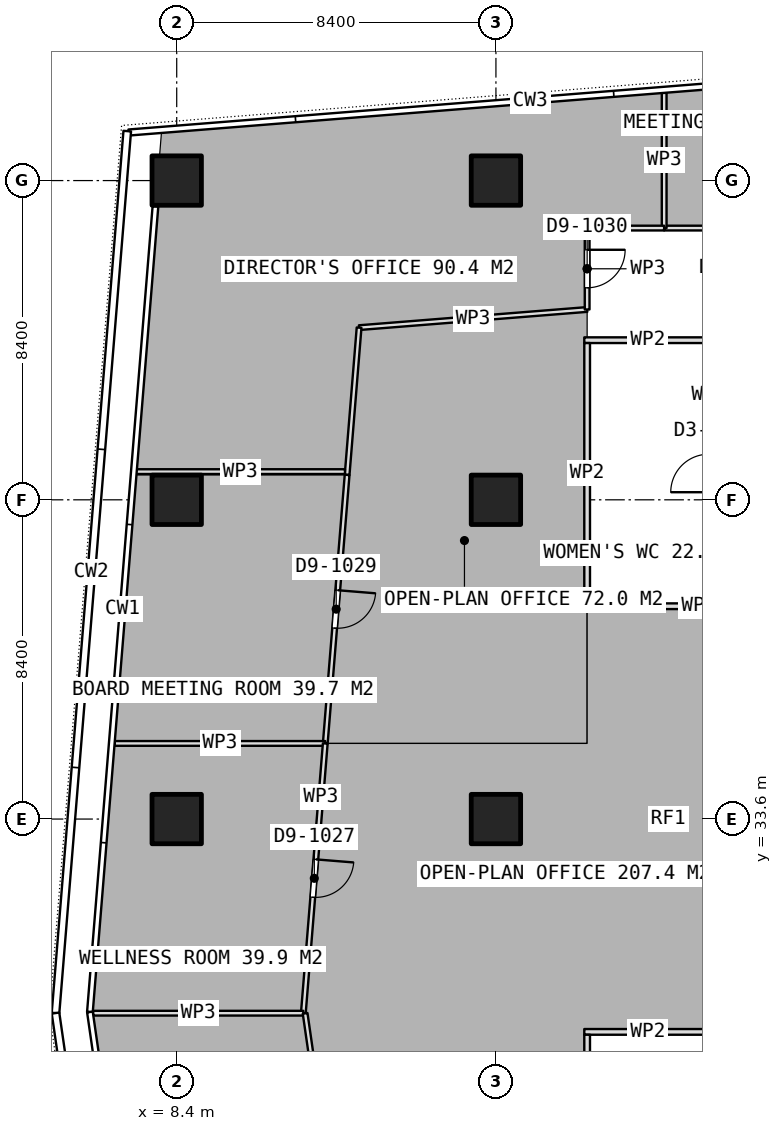
"""IFC4 building model, lengths in metres.
Left out: names, types, materials, properties, quantities, classifications, styles, units other than length and angle.
Written with IfcOpenShell. Run it as: python <this file> out.ifc"""

import sys

from ifc_helpers import new_model, si_unit, direction, frame, frame_2d, origin, origin_2d, place, context, subcontext, project, spatial, rectangle, extrude, element, fill, save


model = new_model("IFC4")
c1 = context("Model", 3, precision=1e-05, world=origin(), true_north=direction((0.0, 1.0)))
c2 = subcontext(c1, "Body", "Model", "MODEL_VIEW")
j1 = project(units=[si_unit("LENGTHUNIT", "METRE"), si_unit("PLANEANGLEUNIT", "RADIAN")], contexts=[c1])
p1 = place(None, origin())
s1 = spatial("IfcSite", under=j1, at=p1, CompositionType="ELEMENT")
p2 = place(p1, origin())
s2 = spatial("IfcBuilding", under=s1, at=p2, CompositionType="ELEMENT")
p3 = place(p2, frame((0.0, 0.0, 276.35)))
s3 = spatial("IfcBuildingStorey", under=s2, at=p3, CompositionType="ELEMENT", Elevation=276.35)
for number, where, z_axis, x_axis in (
    (1, (8.4, 33.6, 0.0), (0.0, 0.0, 1.0), (1.0, 0.0, 0.0)),
    (2, (8.4, 42.0, 0.0), (0.0, 0.0, 1.0), (1.0, 0.0, 0.0)),
    (3, (8.4, 50.4, 0.0), (0.0, 0.0, 1.0), (1.0, 0.0, 0.0)),
    (4, (16.8, 33.6, 0.0), (0.0, 0.0, 1.0), (1.0, 0.0, 0.0)),
    (5, (16.8, 42.0, 0.0), (0.0, 0.0, 1.0), (1.0, 0.0, 0.0)),
    (6, (16.8, 50.4, 0.0), (0.0, 0.0, 1.0), (1.0, 0.0, 0.0)),
):
    element("IfcColumn", number, at=place(p3, frame(where, z_axis=z_axis, x_axis=x_axis)), inside=s3, PredefinedType="COLUMN", context=c2, shape_type="SweptSolid", body=[
        extrude(rectangle(XDim=1.3, YDim=1.3, at=origin_2d()), origin(), (0.0, 0.0, 1.0), 3.75),
    ])
for number, where, z_axis, x_axis in (
    (7, (19.125, 39.2, 0.0), (0.0, 0.0, 1.0), (1.0, 0.0, 0.0)),
    (8, (19.125, 46.2, 0.0), (0.0, 0.0, 1.0), (1.0, 0.0, 0.0)),
):
    element("IfcWall", number, at=place(p3, frame(where, z_axis=z_axis, x_axis=x_axis)), inside=s3, PredefinedType="PARTITIONING", context=c2, shape_type="SweptSolid", body=[
        extrude(rectangle(XDim=3.35, YDim=0.15, at=frame_2d((1.675, 0.0))), origin(), (0.0, 0.0, 1.0), 3.5),
    ])
p4 = place(p3, frame((19.2, 39.275, 0.0), z_axis=(0.0, 0.0, 1.0), x_axis=(0.0, 1.0, 0.0)))
e9 = element("IfcWall", 9, at=p4, inside=s3, PredefinedType="PARTITIONING", context=c2, shape_type="SweptSolid", body=[
    extrude(rectangle(XDim=6.85, YDim=0.15, at=frame_2d((3.425, 0.0))), origin(), (0.0, 0.0, 1.0), 3.5),
])
p5 = place(p3, frame((19.125, 28.0, 0.0), z_axis=(0.0, 0.0, 1.0), x_axis=(1.0, 0.0, 0.0)))
e10 = element("IfcWall", 10, at=p5, inside=s3, PredefinedType="PARTITIONING", context=c2, shape_type="SweptSolid", body=[
    extrude(rectangle(XDim=3.35, YDim=0.15, at=frame_2d((1.675, 0.0))), origin(), (0.0, 0.0, 1.0), 3.5),
])
p6 = place(p3, frame((19.2, 21.075, 0.0), z_axis=(0.0, 0.0, 1.0), x_axis=(0.0, 1.0, 0.0)))
e11 = element("IfcWall", 11, at=p6, inside=s3, PredefinedType="PARTITIONING", context=c2, shape_type="SweptSolid", body=[
    extrude(rectangle(XDim=6.85, YDim=0.15, at=frame_2d((3.425, 0.0))), origin(), (0.0, 0.0, 1.0), 3.5),
])
p7 = place(p3, frame((25.205, 49.15, 0.0), z_axis=(0.0, 0.0, 1.0), x_axis=(-1.0, 0.0, 0.0)))
e12 = element("IfcWall", 12, at=p7, inside=s3, PredefinedType="PARTITIONING", context=c2, shape_type="SweptSolid", body=[
    extrude(rectangle(XDim=3.978, YDim=0.125, at=frame_2d((1.989, 0.0))), origin(), (0.0, 0.0, 1.0), 3.5),
])
p8 = place(p7, frame((1.489, 0.0, 0.0)))
e13 = element("IfcOpeningElement", 13, at=p8, cuts=e12, PredefinedType="OPENING", context=c2, shape_type="SweptSolid", body=[
    extrude(rectangle(XDim=1.0, YDim=2.1, at=frame_2d((0.5, 1.05))), frame((0.0, 0.073, 0.0), z_axis=(0.0, -1.0, 0.0), x_axis=(1.0, 0.0, 0.0)), (0.0, 0.0, 1.0), 0.145),
])
p9 = place(p3, frame((21.227, 49.15, 0.0), z_axis=(0.0, 0.0, 1.0), x_axis=(0.0, 1.0, 0.0)))
e14 = element("IfcWall", 14, at=p9, inside=s3, PredefinedType="PARTITIONING", context=c2, shape_type="SweptSolid", body=[
    extrude(rectangle(XDim=3.558, YDim=0.125, at=frame_2d((1.779, 0.0))), origin(), (0.0, 0.0, 1.0), 3.5),
])
p10 = place(p3, frame((19.2, 47.008, 0.0), z_axis=(0.0, 0.0, 1.0), x_axis=(-0.996842300725, -0.079406721921, 0.0)))
e15 = element("IfcWall", 15, at=p10, inside=s3, PredefinedType="PARTITIONING", context=c2, shape_type="SweptSolid", body=[
    extrude(rectangle(XDim=6.02, YDim=0.125, at=frame_2d((3.01, 0.0))), origin(), (0.0, 0.0, 1.0), 3.5),
])
p11 = place(p3, frame((13.199, 46.53, 0.0), z_axis=(0.0, 0.0, 1.0), x_axis=(-0.081048669132, -0.996710145043, 0.0)))
e16 = element("IfcWall", 16, at=p11, inside=s3, PredefinedType="PARTITIONING", context=c2, shape_type="SweptSolid", body=[
    extrude(rectangle(XDim=3.886, YDim=0.125, at=frame_2d((1.943, 0.0))), origin(), (0.0, 0.0, 1.0), 3.5),
])
p12 = place(p3, frame((12.828, 42.742, 0.0), z_axis=(0.0, 0.0, 1.0), x_axis=(-1.0, 0.0, 0.0)))
e17 = element("IfcWall", 17, at=p12, inside=s3, PredefinedType="PARTITIONING", context=c2, shape_type="SweptSolid", body=[
    extrude(rectangle(XDim=5.505, YDim=0.125, at=frame_2d((2.752, 0.0))), origin(), (0.0, 0.0, 1.0), 3.5),
])
p13 = place(p3, frame((21.226, 49.15, 0.0), z_axis=(0.0, 0.0, 1.0), x_axis=(-1.0, 0.0, 0.0)))
e18 = element("IfcWall", 18, at=p13, inside=s3, PredefinedType="PARTITIONING", context=c2, shape_type="SweptSolid", body=[
    extrude(rectangle(XDim=2.026, YDim=0.125, at=frame_2d((1.013, 0.0))), origin(), (0.0, 0.0, 1.0), 3.5),
])
p14 = place(p3, frame((19.2, 49.15, 0.0), z_axis=(0.0, 0.0, 1.0), x_axis=(0.0, -1.0, 0.0)))
e19 = element("IfcWall", 19, at=p14, inside=s3, PredefinedType="PARTITIONING", context=c2, shape_type="SweptSolid", body=[
    extrude(rectangle(XDim=2.142, YDim=0.125, at=frame_2d((1.071, 0.0))), origin(), (0.0, 0.0, 1.0), 3.5),
])
p15 = place(p14, frame((0.571, 0.0, 0.0)))
e20 = element("IfcOpeningElement", 20, at=p15, cuts=e19, PredefinedType="OPENING", context=c2, shape_type="SweptSolid", body=[
    extrude(rectangle(XDim=1.0, YDim=2.1, at=frame_2d((0.5, 1.05))), frame((0.0, 0.073, 0.0), z_axis=(0.0, -1.0, 0.0), x_axis=(1.0, 0.0, 0.0)), (0.0, 0.0, 1.0), 0.145),
])
p16 = place(p3, frame((12.884, 42.656, 0.0), z_axis=(0.0, 0.0, 1.0), x_axis=(-0.08110159124, -0.996705840205, 0.0)))
e21 = element("IfcWall", 21, at=p16, inside=s3, PredefinedType="PARTITIONING", context=c2, shape_type="SweptSolid", body=[
    extrude(rectangle(XDim=7.089, YDim=0.125, at=frame_2d((3.545, 0.0))), origin(), (0.0, 0.0, 1.0), 3.5),
])
p17 = place(p16, frame((3.045, 0.0, 0.0)))
e22 = element("IfcOpeningElement", 22, at=p17, cuts=e21, PredefinedType="OPENING", context=c2, shape_type="SweptSolid", body=[
    extrude(rectangle(XDim=1.0, YDim=2.1, at=frame_2d((0.5, 1.05))), frame((0.0, 0.073, 0.0), z_axis=(0.0, -1.0, 0.0), x_axis=(1.0, 0.0, 0.0)), (0.0, 0.0, 1.0), 0.145),
])
p18 = place(p3, frame((12.309, 35.59, 0.0), z_axis=(0.0, 0.0, 1.0), x_axis=(-1.0, 0.0, 0.0)))
e23 = element("IfcWall", 23, at=p18, inside=s3, PredefinedType="PARTITIONING", context=c2, shape_type="SweptSolid", body=[
    extrude(rectangle(XDim=5.538, YDim=0.125, at=frame_2d((2.769, 0.0))), origin(), (0.0, 0.0, 1.0), 3.5),
])
p19 = place(p3, frame((12.309, 35.589, 0.0), z_axis=(0.0, 0.0, 1.0), x_axis=(-0.081053384124, -0.996709761627, 0.0)))
e24 = element("IfcWall", 24, at=p19, inside=s3, PredefinedType="PARTITIONING", context=c2, shape_type="SweptSolid", body=[
    extrude(rectangle(XDim=7.121, YDim=0.125, at=frame_2d((3.56, 0.0))), origin(), (0.0, 0.0, 1.0), 3.5),
])
p20 = place(p19, frame((3.06, 0.0, 0.0)))
e25 = element("IfcOpeningElement", 25, at=p20, cuts=e24, PredefinedType="OPENING", context=c2, shape_type="SweptSolid", body=[
    extrude(rectangle(XDim=1.0, YDim=2.1, at=frame_2d((0.5, 1.05))), frame((0.0, 0.073, 0.0), z_axis=(0.0, -1.0, 0.0), x_axis=(1.0, 0.0, 0.0)), (0.0, 0.0, 1.0), 0.145),
])
p21 = place(p3, frame((11.732, 28.492, 0.0), z_axis=(0.0, 0.0, 1.0), x_axis=(-1.0, 0.0, 0.0)))
e26 = element("IfcWall", 26, at=p21, inside=s3, PredefinedType="PARTITIONING", context=c2, shape_type="SweptSolid", body=[
    extrude(rectangle(XDim=5.531, YDim=0.125, at=frame_2d((2.766, 0.0))), origin(), (0.0, 0.0, 1.0), 3.5),
])
p22 = place(p3, frame((11.779, 28.488, 0.0), z_axis=(0.0, 0.0, 1.0), x_axis=(0.143139230014, -0.989702561799, 0.0)))
e27 = element("IfcWall", 27, at=p22, inside=s3, PredefinedType="PARTITIONING", context=c2, shape_type="SweptSolid", body=[
    extrude(rectangle(XDim=7.042, YDim=0.125, at=frame_2d((3.521, 0.0))), origin(), (0.0, 0.0, 1.0), 3.5),
])
p23 = place(p22, frame((3.02, 0.0, 0.0)))
e28 = element("IfcOpeningElement", 28, at=p23, cuts=e27, PredefinedType="OPENING", context=c2, shape_type="SweptSolid", body=[
    extrude(rectangle(XDim=1.0, YDim=2.1, at=frame_2d((0.5, 1.05))), frame((0.0, 0.073, 0.0), z_axis=(0.0, -1.0, 0.0), x_axis=(1.0, 0.0, 0.0)), (0.0, 0.0, 1.0), 0.145),
])
p24 = place(p15, origin())
e29 = element("IfcDoor", 29, at=p24, inside=s3, OperationType="SINGLE_SWING_LEFT", PredefinedType="DOOR", context=c2, shape_type="SweptSolid", body=[
    extrude(rectangle(XDim=1.0, YDim=2.1, at=frame_2d((0.5, 1.05))), frame((0.0, 0.025, 0.0), z_axis=(0.0, -1.0, 0.0), x_axis=(1.0, 0.0, 0.0)), (0.0, 0.0, 1.0), 0.05),
])
fill(e20, e29)
p25 = place(p17, origin())
e30 = element("IfcDoor", 30, at=p25, inside=s3, OperationType="SINGLE_SWING_LEFT", PredefinedType="DOOR", context=c2, shape_type="SweptSolid", body=[
    extrude(rectangle(XDim=1.0, YDim=2.1, at=frame_2d((0.5, 1.05))), frame((0.0, 0.025, 0.0), z_axis=(0.0, -1.0, 0.0), x_axis=(1.0, 0.0, 0.0)), (0.0, 0.0, 1.0), 0.05),
])
fill(e22, e30)
p26 = place(p20, origin())
e31 = element("IfcDoor", 31, at=p26, inside=s3, OperationType="SINGLE_SWING_LEFT", PredefinedType="DOOR", context=c2, shape_type="SweptSolid", body=[
    extrude(rectangle(XDim=1.0, YDim=2.1, at=frame_2d((0.5, 1.05))), frame((0.0, 0.025, 0.0), z_axis=(0.0, -1.0, 0.0), x_axis=(1.0, 0.0, 0.0)), (0.0, 0.0, 1.0), 0.05),
])
fill(e25, e31)
save(model, sys.argv[1])
